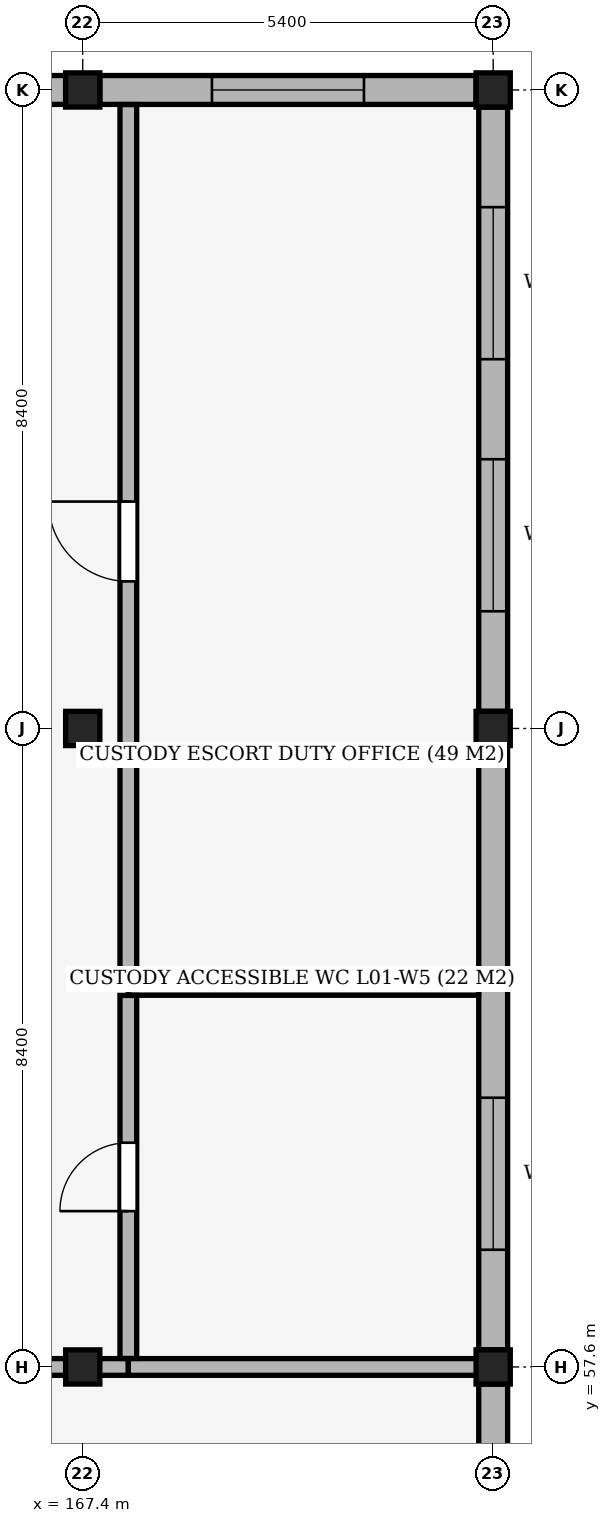
"""IFC4 building model, lengths in metres.
Left out: names, types, materials, properties, quantities, classifications, styles, units other than length and angle.
Written with IfcOpenShell. Run it as: python <this file> out.ifc"""

import sys

from ifc_helpers import new_model, si_unit, direction, frame, frame_2d, origin, origin_2d, place, context, subcontext, project, spatial, rectangle, extrude, element, fill, save


model = new_model("IFC4")
c1 = context("Model", 3, precision=1e-05, world=origin(), true_north=direction((0.0, 1.0)))
c2 = subcontext(c1, "Body", "Model", "MODEL_VIEW")
j1 = project(units=[si_unit("LENGTHUNIT", "METRE"), si_unit("PLANEANGLEUNIT", "RADIAN")], contexts=[c1])
p1 = place(None, origin())
s1 = spatial("IfcSite", under=j1, at=p1, CompositionType="ELEMENT")
p2 = place(p1, origin())
s2 = spatial("IfcBuilding", under=s1, at=p2, CompositionType="ELEMENT")
p3 = place(p2, frame((0.0, 0.0, 5.1)))
s3 = spatial("IfcBuildingStorey", under=s2, at=p3, CompositionType="ELEMENT", Elevation=5.1)
for number, where, z_axis, x_axis in (
    (1, (167.4, 57.6, 0.0), (0.0, 0.0, 1.0), (1.0, 0.0, 0.0)),
    (2, (167.4, 66.0, 0.0), (0.0, 0.0, 1.0), (1.0, 0.0, 0.0)),
    (3, (167.4, 74.4, 0.0), (0.0, 0.0, 1.0), (1.0, 0.0, 0.0)),
    (4, (172.8, 57.6, 0.0), (0.0, 0.0, 1.0), (1.0, 0.0, 0.0)),
    (5, (172.8, 66.0, 0.0), (0.0, 0.0, 1.0), (1.0, 0.0, 0.0)),
    (6, (172.8, 74.4, 0.0), (0.0, 0.0, 1.0), (1.0, 0.0, 0.0)),
):
    element("IfcColumn", number, at=place(p3, frame(where, z_axis=z_axis, x_axis=x_axis)), inside=s3, PredefinedType="COLUMN", context=c2, shape_type="SweptSolid", body=[
        extrude(rectangle(XDim=0.45, YDim=0.45, at=origin_2d()), origin(), (0.0, 0.0, 1.0), 5.1),
    ])
p4 = place(p3, frame((162.225, 74.4, 0.0), z_axis=(0.0, 0.0, 1.0), x_axis=(1.0, 0.0, 0.0)))
e7 = element("IfcWall", 7, at=p4, inside=s3, PredefinedType="SOLIDWALL", context=c2, shape_type="SweptSolid", body=[
    extrude(rectangle(XDim=4.95, YDim=0.38, at=frame_2d((2.475, 0.0))), origin(), (0.0, 0.0, 1.0), 4.22),
])
p5 = place(p4, frame((1.475, 0.0, 2.1)))
e8 = element("IfcOpeningElement", 8, at=p5, cuts=e7, PredefinedType="OPENING", context=c2, shape_type="SweptSolid", body=[
    extrude(rectangle(XDim=2.0, YDim=1.2, at=frame_2d((1.0, 0.6))), frame((0.0, 0.205, 0.0), z_axis=(0.0, -1.0, 0.0), x_axis=(1.0, 0.0, 0.0)), (0.0, 0.0, 1.0), 0.41),
])
p6 = place(p3, frame((167.625, 74.4, 0.0), z_axis=(0.0, 0.0, 1.0), x_axis=(1.0, 0.0, 0.0)))
e9 = element("IfcWall", 9, at=p6, inside=s3, PredefinedType="SOLIDWALL", context=c2, shape_type="SweptSolid", body=[
    extrude(rectangle(XDim=4.95, YDim=0.38, at=frame_2d((2.475, 0.0))), origin(), (0.0, 0.0, 1.0), 4.22),
])
p7 = place(p6, frame((1.475, 0.0, 2.1)))
e10 = element("IfcOpeningElement", 10, at=p7, cuts=e9, PredefinedType="OPENING", context=c2, shape_type="SweptSolid", body=[
    extrude(rectangle(XDim=2.0, YDim=1.2, at=frame_2d((1.0, 0.6))), frame((0.0, 0.205, 0.0), z_axis=(0.0, -1.0, 0.0), x_axis=(1.0, 0.0, 0.0)), (0.0, 0.0, 1.0), 0.41),
])
p8 = place(p3, frame((172.8, 74.175, 0.0), z_axis=(0.0, 0.0, 1.0), x_axis=(0.0, -1.0, 0.0)))
e11 = element("IfcWall", 11, at=p8, inside=s3, PredefinedType="SOLIDWALL", context=c2, shape_type="SweptSolid", body=[
    extrude(rectangle(XDim=7.95, YDim=0.38, at=frame_2d((3.975, 0.0))), origin(), (0.0, 0.0, 1.0), 4.02),
])
p9 = place(p8, frame((1.317, 0.0, 2.1)))
e12 = element("IfcOpeningElement", 12, at=p9, cuts=e11, PredefinedType="OPENING", context=c2, shape_type="SweptSolid", body=[
    extrude(rectangle(XDim=2.0, YDim=1.2, at=frame_2d((1.0, 0.6))), frame((0.0, 0.205, 0.0), z_axis=(0.0, -1.0, 0.0), x_axis=(1.0, 0.0, 0.0)), (0.0, 0.0, 1.0), 0.41),
])
p10 = place(p8, frame((4.633, 0.0, 2.1)))
e13 = element("IfcOpeningElement", 13, at=p10, cuts=e11, PredefinedType="OPENING", context=c2, shape_type="SweptSolid", body=[
    extrude(rectangle(XDim=2.0, YDim=1.2, at=frame_2d((1.0, 0.6))), frame((0.0, 0.205, 0.0), z_axis=(0.0, -1.0, 0.0), x_axis=(1.0, 0.0, 0.0)), (0.0, 0.0, 1.0), 0.41),
])
p11 = place(p3, frame((172.8, 65.775, 0.0), z_axis=(0.0, 0.0, 1.0), x_axis=(0.0, -1.0, 0.0)))
e14 = element("IfcWall", 14, at=p11, inside=s3, PredefinedType="SOLIDWALL", context=c2, shape_type="SweptSolid", body=[
    extrude(rectangle(XDim=7.95, YDim=0.38, at=frame_2d((3.975, 0.0))), origin(), (0.0, 0.0, 1.0), 4.02),
])
p12 = place(p11, frame((4.633, 0.0, 2.1)))
e15 = element("IfcOpeningElement", 15, at=p12, cuts=e14, PredefinedType="OPENING", context=c2, shape_type="SweptSolid", body=[
    extrude(rectangle(XDim=2.0, YDim=1.2, at=frame_2d((1.0, 0.6))), frame((0.0, 0.205, 0.0), z_axis=(0.0, -1.0, 0.0), x_axis=(1.0, 0.0, 0.0)), (0.0, 0.0, 1.0), 0.41),
])
p13 = place(p3, frame((172.8, 57.375, 0.0), z_axis=(0.0, 0.0, 1.0), x_axis=(0.0, -1.0, 0.0)))
e16 = element("IfcWall", 16, at=p13, inside=s3, PredefinedType="SOLIDWALL", context=c2, shape_type="SweptSolid", body=[
    extrude(rectangle(XDim=7.95, YDim=0.38, at=frame_2d((3.975, 0.0))), origin(), (0.0, 0.0, 1.0), 4.02),
])
p14 = place(p13, frame((1.317, 0.0, 2.1)))
e17 = element("IfcOpeningElement", 17, at=p14, cuts=e16, PredefinedType="OPENING", context=c2, shape_type="SweptSolid", body=[
    extrude(rectangle(XDim=2.0, YDim=1.2, at=frame_2d((1.0, 0.6))), frame((0.0, 0.205, 0.0), z_axis=(0.0, -1.0, 0.0), x_axis=(1.0, 0.0, 0.0)), (0.0, 0.0, 1.0), 0.41),
])
p15 = place(p13, frame((4.633, 0.0, 2.1)))
e18 = element("IfcOpeningElement", 18, at=p15, cuts=e16, PredefinedType="OPENING", context=c2, shape_type="SweptSolid", body=[
    extrude(rectangle(XDim=2.0, YDim=1.2, at=frame_2d((1.0, 0.6))), frame((0.0, 0.205, 0.0), z_axis=(0.0, -1.0, 0.0), x_axis=(1.0, 0.0, 0.0)), (0.0, 0.0, 1.0), 0.41),
])
p16 = place(p3, frame((156.6, 57.6, 0.0), z_axis=(0.0, 0.0, 1.0), x_axis=(1.0, 0.0, 0.0)))
e19 = element("IfcWall", 19, at=p16, inside=s3, PredefinedType="PARTITIONING", context=c2, shape_type="SweptSolid", body=[
    extrude(rectangle(XDim=11.4, YDim=0.22, at=frame_2d((5.7, 0.0))), origin(), (0.0, 0.0, 1.0), 4.02),
])
p17 = place(p3, frame((168.0, 57.6, 0.0), z_axis=(0.0, 0.0, 1.0), x_axis=(1.0, 0.0, 0.0)))
e20 = element("IfcWall", 20, at=p17, inside=s3, PredefinedType="PARTITIONING", context=c2, shape_type="SweptSolid", body=[
    extrude(rectangle(XDim=4.741, YDim=0.22, at=frame_2d((2.371, 0.0))), origin(), (0.0, 0.0, 1.0), 4.02),
])
p18 = place(p3, frame((168.0, 62.6, 0.0), z_axis=(0.0, 0.0, 1.0), x_axis=(1.0, 0.0, 0.0)))
e21 = element("IfcWall", 21, at=p18, inside=s3, PredefinedType="PARTITIONING", context=c2, shape_type="SweptSolid", body=[
    extrude(rectangle(XDim=4.608, YDim=0.22, at=frame_2d((2.304, 0.0))), origin(), (0.0, 0.0, 1.0), 4.02),
])
p19 = place(p3, frame((168.0, 57.712, 0.0), z_axis=(0.0, 0.0, 1.0), x_axis=(0.0, 1.0, 0.0)))
e22 = element("IfcWall", 22, at=p19, inside=s3, PredefinedType="PARTITIONING", context=c2, shape_type="SweptSolid", body=[
    extrude(rectangle(XDim=4.776, YDim=0.22, at=frame_2d((2.388, 0.0))), origin(), (0.0, 0.0, 1.0), 4.22),
])
p20 = place(p19, frame((1.938, 0.0, 0.0)))
e23 = element("IfcOpeningElement", 23, at=p20, cuts=e22, PredefinedType="OPENING", context=c2, shape_type="SweptSolid", body=[
    extrude(rectangle(XDim=0.9, YDim=2.1, at=frame_2d((0.45, 1.05))), frame((0.0, 0.125, 0.0), z_axis=(0.0, -1.0, 0.0), x_axis=(1.0, 0.0, 0.0)), (0.0, 0.0, 1.0), 0.25),
])
p21 = place(p3, frame((168.0, 62.712, 0.0), z_axis=(0.0, 0.0, 1.0), x_axis=(0.0, 1.0, 0.0)))
e24 = element("IfcWall", 24, at=p21, inside=s3, PredefinedType="PARTITIONING", context=c2, shape_type="SweptSolid", body=[
    extrude(rectangle(XDim=11.496, YDim=0.22, at=frame_2d((5.748, 0.0))), origin(), (0.0, 0.0, 1.0), 4.22),
])
p22 = place(p21, frame((5.223, 0.0, 0.0)))
e25 = element("IfcOpeningElement", 25, at=p22, cuts=e24, PredefinedType="OPENING", context=c2, shape_type="SweptSolid", body=[
    extrude(rectangle(XDim=1.05, YDim=2.15, at=frame_2d((0.525, 1.075))), frame((0.0, 0.125, 0.0), z_axis=(0.0, -1.0, 0.0), x_axis=(1.0, 0.0, 0.0)), (0.0, 0.0, 1.0), 0.25),
])
p23 = place(p7, origin())
e26 = element("IfcWindow", 26, at=p23, inside=s3, PartitioningType="SINGLE_PANEL", PredefinedType="WINDOW", context=c2, shape_type="SweptSolid", body=[
    extrude(rectangle(XDim=2.0, YDim=1.2, at=frame_2d((1.0, 0.6))), frame((0.0, 0.03, 0.0), z_axis=(0.0, -1.0, 0.0), x_axis=(1.0, 0.0, 0.0)), (0.0, 0.0, 1.0), 0.06),
])
fill(e10, e26)
p24 = place(p9, origin())
e27 = element("IfcWindow", 27, at=p24, inside=s3, PartitioningType="SINGLE_PANEL", PredefinedType="WINDOW", context=c2, shape_type="SweptSolid", body=[
    extrude(rectangle(XDim=2.0, YDim=1.2, at=frame_2d((1.0, 0.6))), frame((0.0, 0.03, 0.0), z_axis=(0.0, -1.0, 0.0), x_axis=(1.0, 0.0, 0.0)), (0.0, 0.0, 1.0), 0.06),
])
fill(e12, e27)
p25 = place(p10, origin())
e28 = element("IfcWindow", 28, at=p25, inside=s3, PartitioningType="SINGLE_PANEL", PredefinedType="WINDOW", context=c2, shape_type="SweptSolid", body=[
    extrude(rectangle(XDim=2.0, YDim=1.2, at=frame_2d((1.0, 0.6))), frame((0.0, 0.03, 0.0), z_axis=(0.0, -1.0, 0.0), x_axis=(1.0, 0.0, 0.0)), (0.0, 0.0, 1.0), 0.06),
])
fill(e13, e28)
p26 = place(p12, origin())
e29 = element("IfcWindow", 29, at=p26, inside=s3, PartitioningType="SINGLE_PANEL", PredefinedType="WINDOW", context=c2, shape_type="SweptSolid", body=[
    extrude(rectangle(XDim=2.0, YDim=1.2, at=frame_2d((1.0, 0.6))), frame((0.0, 0.03, 0.0), z_axis=(0.0, -1.0, 0.0), x_axis=(1.0, 0.0, 0.0)), (0.0, 0.0, 1.0), 0.06),
])
fill(e15, e29)
p27 = place(p20, origin())
e30 = element("IfcDoor", 30, at=p27, inside=s3, OperationType="SINGLE_SWING_LEFT", PredefinedType="DOOR", context=c2, shape_type="SweptSolid", body=[
    extrude(rectangle(XDim=0.9, YDim=2.1, at=frame_2d((0.45, 1.05))), frame((0.0, 0.025, 0.0), z_axis=(0.0, -1.0, 0.0), x_axis=(1.0, 0.0, 0.0)), (0.0, 0.0, 1.0), 0.05),
])
fill(e23, e30)
p28 = place(p22, origin())
e31 = element("IfcDoor", 31, at=p28, inside=s3, OperationType="SINGLE_SWING_RIGHT", PredefinedType="DOOR", context=c2, shape_type="SweptSolid", body=[
    extrude(rectangle(XDim=1.05, YDim=2.15, at=frame_2d((0.525, 1.075))), frame((0.0, 0.025, 0.0), z_axis=(0.0, -1.0, 0.0), x_axis=(1.0, 0.0, 0.0)), (0.0, 0.0, 1.0), 0.05),
])
fill(e25, e31)
save(model, sys.argv[1])
